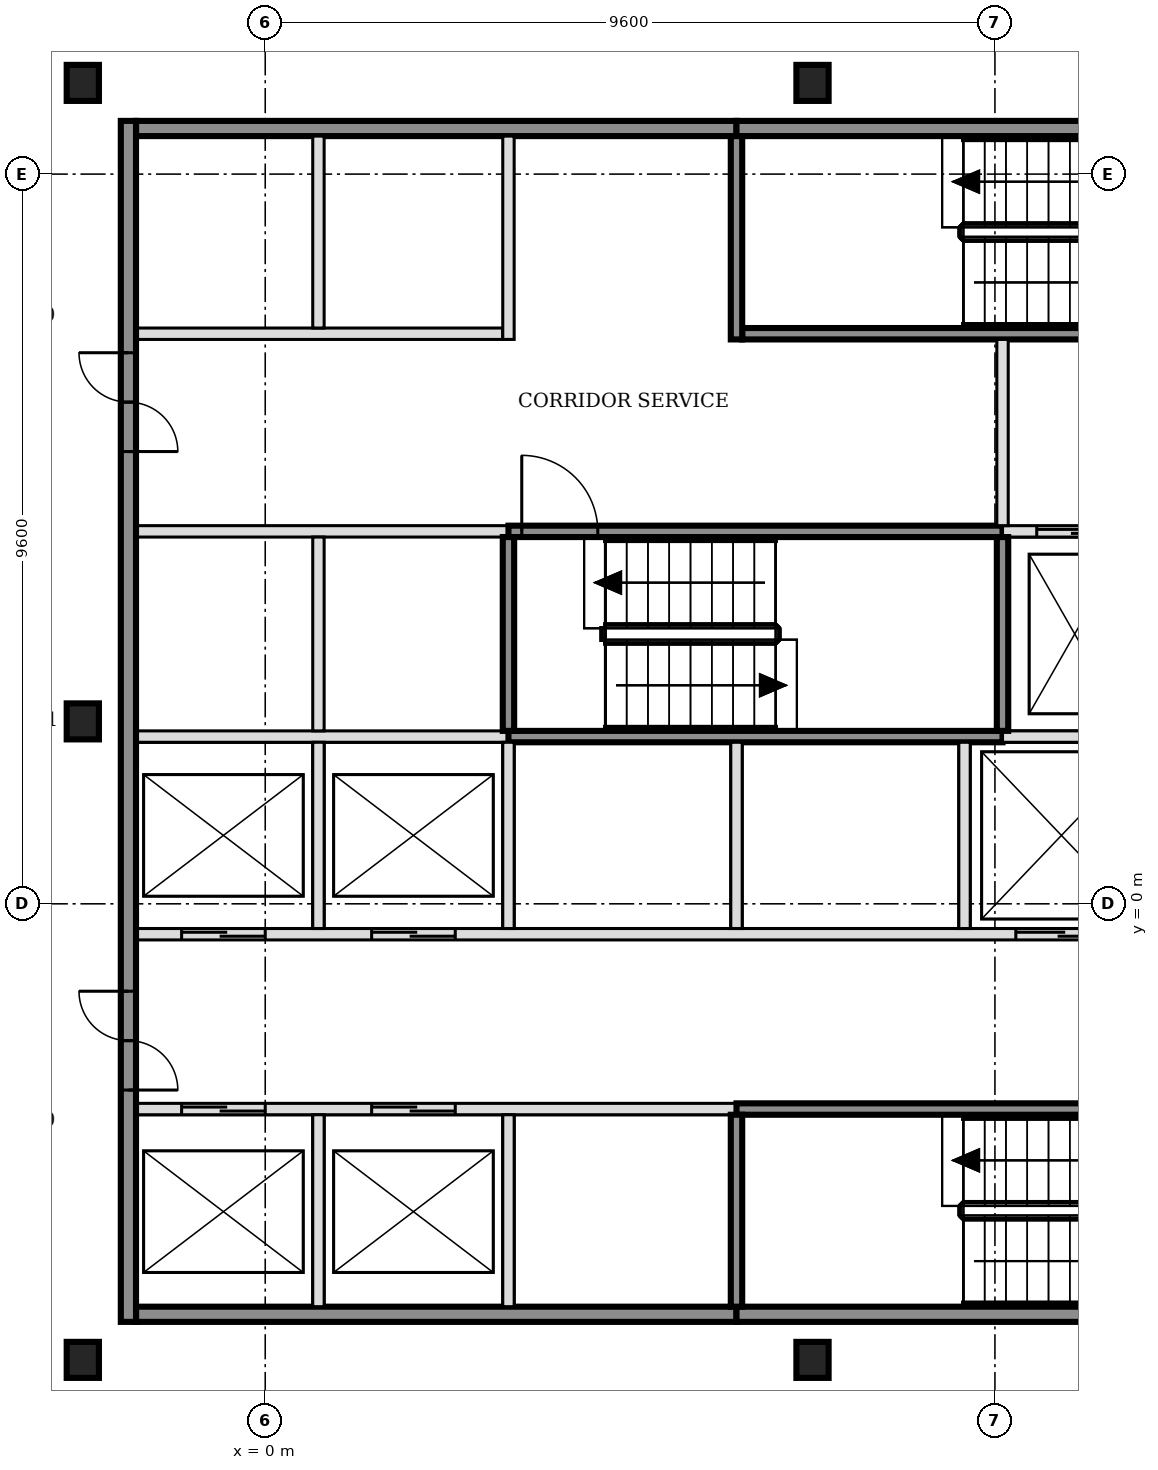
"""IFC4 building model, lengths in metres.
Left out: names, types, materials, properties, quantities, classifications, styles, units other than length and angle.
Written with IfcOpenShell. Run it as: python <this file> out.ifc"""

import sys

from ifc_helpers import new_model, si_unit, direction, frame, frame_2d, origin, origin_2d, place, context, subcontext, project, spatial, rectangle, i_section, extrude, element, fill, save


model = new_model("IFC4")
c1 = context("Model", 3, precision=1e-05, world=origin(), true_north=direction((0.0, 1.0)))
c2 = subcontext(c1, "Body", "Model", "MODEL_VIEW")
j1 = project(units=[si_unit("LENGTHUNIT", "METRE"), si_unit("PLANEANGLEUNIT", "RADIAN")], contexts=[c1])
p1 = place(None, origin())
s1 = spatial("IfcSite", under=j1, at=p1, CompositionType="ELEMENT")
p2 = place(p1, origin())
s2 = spatial("IfcBuilding", under=s1, at=p2, CompositionType="ELEMENT")
p3 = place(p2, frame((0.0, 0.0, 119.4)))
s3 = spatial("IfcBuildingStorey", under=s2, at=p3, CompositionType="ELEMENT", Elevation=119.4)
for number, where, z_axis, x_axis in (
    (1, (-2.4, -6.0, -0.25), (0.0, 0.0, 1.0), (1.0, 0.0, 0.0)),
    (2, (7.2, -6.0, -0.25), (0.0, 0.0, 1.0), (1.0, 0.0, 0.0)),
    (3, (-2.4, 2.4, -0.25), (0.0, 0.0, 1.0), (1.0, 0.0, 0.0)),
    (4, (-2.4, 10.8, -0.25), (0.0, 0.0, 1.0), (1.0, 0.0, 0.0)),
    (5, (7.2, 10.8, -0.25), (0.0, 0.0, 1.0), (1.0, 0.0, 0.0)),
):
    element("IfcColumn", number, at=place(p3, frame(where, z_axis=z_axis, x_axis=x_axis)), inside=s3, PredefinedType="COLUMN", context=c2, shape_type="SweptSolid", body=[
        extrude(i_section(OverallWidth=0.424, OverallDepth=0.474, WebThickness=0.048, FlangeThickness=0.077, FilletRadius=0.015, at=origin_2d()), origin(), (0.0, 0.0, 1.0), 6.1),
    ])
p4 = place(p3, frame((-1.7, -5.4, 0.0), z_axis=(0.0, 0.0, 1.0), x_axis=(1.0, 0.0, 0.0)))
e6 = element("IfcWall", 6, at=p4, inside=s3, PredefinedType="SOLIDWALL", context=c2, shape_type="SweptSolid", body=[
    extrude(rectangle(XDim=7.9, YDim=0.2, at=frame_2d((3.95, 0.0))), origin(), (0.0, 0.0, 1.0), 5.85),
])
p5 = place(p3, frame((6.2, -5.4, 0.0), z_axis=(0.0, 0.0, 1.0), x_axis=(1.0, 0.0, 0.0)))
e7 = element("IfcWall", 7, at=p5, inside=s3, PredefinedType="SOLIDWALL", context=c2, shape_type="SweptSolid", body=[
    extrude(rectangle(XDim=6.5, YDim=0.2, at=frame_2d((3.25, 0.0))), origin(), (0.0, 0.0, 1.0), 5.85),
])
p6 = place(p3, frame((-1.7, -2.7, 0.0), z_axis=(0.0, 0.0, 1.0), x_axis=(1.0, 0.0, 0.0)))
e8 = element("IfcWall", 8, at=p6, inside=s3, PredefinedType="SOLIDWALL", context=c2, shape_type="SweptSolid", body=[
    extrude(rectangle(XDim=7.9, YDim=0.15, at=frame_2d((3.95, 0.0))), origin(), (0.0, 0.0, 1.0), 5.85),
])
p7 = place(p6, frame((0.6, 0.0, 0.0)))
e9 = element("IfcOpeningElement", 9, at=p7, cuts=e8, PredefinedType="OPENING", context=c2, shape_type="SweptSolid", body=[
    extrude(rectangle(XDim=1.1, YDim=2.1, at=frame_2d((0.55, 1.05))), frame((0.0, 0.085, 0.0), z_axis=(0.0, -1.0, 0.0), x_axis=(1.0, 0.0, 0.0)), (0.0, 0.0, 1.0), 0.17),
])
p8 = place(p6, frame((3.1, 0.0, 0.0)))
e10 = element("IfcOpeningElement", 10, at=p8, cuts=e8, PredefinedType="OPENING", context=c2, shape_type="SweptSolid", body=[
    extrude(rectangle(XDim=1.1, YDim=2.1, at=frame_2d((0.55, 1.05))), frame((0.0, 0.085, 0.0), z_axis=(0.0, -1.0, 0.0), x_axis=(1.0, 0.0, 0.0)), (0.0, 0.0, 1.0), 0.17),
])
p9 = place(p3, frame((6.2, -2.7, 0.0), z_axis=(0.0, 0.0, 1.0), x_axis=(1.0, 0.0, 0.0)))
e11 = element("IfcWall", 11, at=p9, inside=s3, PredefinedType="SOLIDWALL", context=c2, shape_type="SweptSolid", body=[
    extrude(rectangle(XDim=6.425, YDim=0.15, at=frame_2d((3.212, 0.0))), origin(), (0.0, 0.0, 1.0), 5.85),
])
p10 = place(p9, frame((5.3, 0.0, 0.0)))
e12 = element("IfcOpeningElement", 12, at=p10, cuts=e11, PredefinedType="OPENING", context=c2, shape_type="SweptSolid", body=[
    extrude(rectangle(XDim=1.0, YDim=2.1, at=frame_2d((0.5, 1.05))), frame((0.0, 0.085, 0.0), z_axis=(0.0, -1.0, 0.0), x_axis=(1.0, 0.0, 0.0)), (0.0, 0.0, 1.0), 0.17),
])
p11 = place(p3, frame((-1.7, -0.4, 0.0), z_axis=(0.0, 0.0, 1.0), x_axis=(1.0, 0.0, 0.0)))
e13 = element("IfcWall", 13, at=p11, inside=s3, PredefinedType="SOLIDWALL", context=c2, shape_type="SweptSolid", body=[
    extrude(rectangle(XDim=15.925, YDim=0.15, at=frame_2d((7.962, 0.0))), origin(), (0.0, 0.0, 1.0), 5.85),
])
p12 = place(p11, frame((0.6, 0.0, 0.0)))
e14 = element("IfcOpeningElement", 14, at=p12, cuts=e13, PredefinedType="OPENING", context=c2, shape_type="SweptSolid", body=[
    extrude(rectangle(XDim=1.1, YDim=2.1, at=frame_2d((0.55, 1.05))), frame((0.0, 0.085, 0.0), z_axis=(0.0, -1.0, 0.0), x_axis=(1.0, 0.0, 0.0)), (0.0, 0.0, 1.0), 0.17),
])
p13 = place(p11, frame((3.1, 0.0, 0.0)))
e15 = element("IfcOpeningElement", 15, at=p13, cuts=e13, PredefinedType="OPENING", context=c2, shape_type="SweptSolid", body=[
    extrude(rectangle(XDim=1.1, YDim=2.1, at=frame_2d((0.55, 1.05))), frame((0.0, 0.085, 0.0), z_axis=(0.0, -1.0, 0.0), x_axis=(1.0, 0.0, 0.0)), (0.0, 0.0, 1.0), 0.17),
])
p14 = place(p11, frame((11.575, 0.0, 0.0)))
e16 = element("IfcOpeningElement", 16, at=p14, cuts=e13, PredefinedType="OPENING", context=c2, shape_type="SweptSolid", body=[
    extrude(rectangle(XDim=1.2, YDim=2.1, at=frame_2d((0.6, 1.05))), frame((0.0, 0.085, 0.0), z_axis=(0.0, -1.0, 0.0), x_axis=(1.0, 0.0, 0.0)), (0.0, 0.0, 1.0), 0.17),
])
p15 = place(p11, frame((14.125, 0.0, 0.0)))
e17 = element("IfcOpeningElement", 17, at=p15, cuts=e13, PredefinedType="OPENING", context=c2, shape_type="SweptSolid", body=[
    extrude(rectangle(XDim=1.2, YDim=2.1, at=frame_2d((0.6, 1.05))), frame((0.0, 0.085, 0.0), z_axis=(0.0, -1.0, 0.0), x_axis=(1.0, 0.0, 0.0)), (0.0, 0.0, 1.0), 0.17),
])
p16 = place(p3, frame((-1.7, 2.2, 0.0), z_axis=(0.0, 0.0, 1.0), x_axis=(1.0, 0.0, 0.0)))
e18 = element("IfcWall", 18, at=p16, inside=s3, PredefinedType="SOLIDWALL", context=c2, shape_type="SweptSolid", body=[
    extrude(rectangle(XDim=4.9, YDim=0.15, at=frame_2d((2.45, 0.0))), origin(), (0.0, 0.0, 1.0), 5.85),
])
p17 = place(p3, frame((3.2, 2.2, 0.0), z_axis=(0.0, 0.0, 1.0), x_axis=(1.0, 0.0, 0.0)))
e19 = element("IfcWall", 19, at=p17, inside=s3, PredefinedType="SOLIDWALL", context=c2, shape_type="SweptSolid", body=[
    extrude(rectangle(XDim=6.5, YDim=0.15, at=frame_2d((3.25, 0.0))), origin(), (0.0, 0.0, 1.0), 5.85),
])
p18 = place(p3, frame((9.7, 2.2, 0.0), z_axis=(0.0, 0.0, 1.0), x_axis=(1.0, 0.0, 0.0)))
e20 = element("IfcWall", 20, at=p18, inside=s3, PredefinedType="SOLIDWALL", context=c2, shape_type="SweptSolid", body=[
    extrude(rectangle(XDim=4.525, YDim=0.15, at=frame_2d((2.263, 0.0))), origin(), (0.0, 0.0, 1.0), 5.85),
])
p19 = place(p3, frame((-1.7, 4.9, 0.0), z_axis=(0.0, 0.0, 1.0), x_axis=(1.0, 0.0, 0.0)))
e21 = element("IfcWall", 21, at=p19, inside=s3, PredefinedType="SOLIDWALL", context=c2, shape_type="SweptSolid", body=[
    extrude(rectangle(XDim=4.9, YDim=0.15, at=frame_2d((2.45, 0.0))), origin(), (0.0, 0.0, 1.0), 5.85),
])
p20 = place(p3, frame((3.2, 4.9, 0.0), z_axis=(0.0, 0.0, 1.0), x_axis=(1.0, 0.0, 0.0)))
e22 = element("IfcWall", 22, at=p20, inside=s3, PredefinedType="SOLIDWALL", context=c2, shape_type="SweptSolid", body=[
    extrude(rectangle(XDim=6.5, YDim=0.15, at=frame_2d((3.25, 0.0))), origin(), (0.0, 0.0, 1.0), 5.85),
])
p21 = place(p20, frame((0.175, 0.0, 0.0)))
e23 = element("IfcOpeningElement", 23, at=p21, cuts=e22, PredefinedType="OPENING", context=c2, shape_type="SweptSolid", body=[
    extrude(rectangle(XDim=1.0, YDim=2.1, at=frame_2d((0.5, 1.05))), frame((0.0, 0.085, 0.0), z_axis=(0.0, -1.0, 0.0), x_axis=(1.0, 0.0, 0.0)), (0.0, 0.0, 1.0), 0.17),
])
p22 = place(p3, frame((9.7, 4.9, 0.0), z_axis=(0.0, 0.0, 1.0), x_axis=(1.0, 0.0, 0.0)))
e24 = element("IfcWall", 24, at=p22, inside=s3, PredefinedType="SOLIDWALL", context=c2, shape_type="SweptSolid", body=[
    extrude(rectangle(XDim=6.4, YDim=0.15, at=frame_2d((3.2, 0.0))), origin(), (0.0, 0.0, 1.0), 5.85),
])
p23 = place(p22, frame((0.45, 0.0, 0.0)))
e25 = element("IfcOpeningElement", 25, at=p23, cuts=e24, PredefinedType="OPENING", context=c2, shape_type="SweptSolid", body=[
    extrude(rectangle(XDim=1.0, YDim=2.1, at=frame_2d((0.5, 1.05))), frame((0.0, 0.085, 0.0), z_axis=(0.0, -1.0, 0.0), x_axis=(1.0, 0.0, 0.0)), (0.0, 0.0, 1.0), 0.17),
])
p24 = place(p22, frame((2.35, 0.0, 0.0)))
e26 = element("IfcOpeningElement", 26, at=p24, cuts=e24, PredefinedType="OPENING", context=c2, shape_type="SweptSolid", body=[
    extrude(rectangle(XDim=1.0, YDim=2.1, at=frame_2d((0.5, 1.05))), frame((0.0, 0.085, 0.0), z_axis=(0.0, -1.0, 0.0), x_axis=(1.0, 0.0, 0.0)), (0.0, 0.0, 1.0), 0.17),
])
p25 = place(p22, frame((4.7, 0.0, 0.0)))
e27 = element("IfcOpeningElement", 27, at=p25, cuts=e24, PredefinedType="OPENING", context=c2, shape_type="SweptSolid", body=[
    extrude(rectangle(XDim=0.9, YDim=2.1, at=frame_2d((0.45, 1.05))), frame((0.0, 0.085, 0.0), z_axis=(0.0, -1.0, 0.0), x_axis=(1.0, 0.0, 0.0)), (0.0, 0.0, 1.0), 0.17),
])
p26 = place(p3, frame((-1.7, 7.5, 0.0), z_axis=(0.0, 0.0, 1.0), x_axis=(1.0, 0.0, 0.0)))
e28 = element("IfcWall", 28, at=p26, inside=s3, PredefinedType="SOLIDWALL", context=c2, shape_type="SweptSolid", body=[
    extrude(rectangle(XDim=4.825, YDim=0.15, at=frame_2d((2.413, 0.0))), origin(), (0.0, 0.0, 1.0), 5.85),
])
p27 = place(p3, frame((6.275, 7.5, 0.0), z_axis=(0.0, 0.0, 1.0), x_axis=(1.0, 0.0, 0.0)))
e29 = element("IfcWall", 29, at=p27, inside=s3, PredefinedType="SOLIDWALL", context=c2, shape_type="SweptSolid", body=[
    extrude(rectangle(XDim=6.425, YDim=0.15, at=frame_2d((3.212, 0.0))), origin(), (0.0, 0.0, 1.0), 5.85),
])
p28 = place(p27, frame((5.225, 0.0, 0.0)))
e30 = element("IfcOpeningElement", 30, at=p28, cuts=e29, PredefinedType="OPENING", context=c2, shape_type="SweptSolid", body=[
    extrude(rectangle(XDim=1.0, YDim=2.1, at=frame_2d((0.5, 1.05))), frame((0.0, 0.085, 0.0), z_axis=(0.0, -1.0, 0.0), x_axis=(1.0, 0.0, 0.0)), (0.0, 0.0, 1.0), 0.17),
])
p29 = place(p3, frame((-1.7, 10.2, 0.0), z_axis=(0.0, 0.0, 1.0), x_axis=(1.0, 0.0, 0.0)))
e31 = element("IfcWall", 31, at=p29, inside=s3, PredefinedType="SOLIDWALL", context=c2, shape_type="SweptSolid", body=[
    extrude(rectangle(XDim=7.9, YDim=0.2, at=frame_2d((3.95, 0.0))), origin(), (0.0, 0.0, 1.0), 5.85),
])
p30 = place(p3, frame((6.2, 10.2, 0.0), z_axis=(0.0, 0.0, 1.0), x_axis=(1.0, 0.0, 0.0)))
e32 = element("IfcWall", 32, at=p30, inside=s3, PredefinedType="SOLIDWALL", context=c2, shape_type="SweptSolid", body=[
    extrude(rectangle(XDim=6.5, YDim=0.2, at=frame_2d((3.25, 0.0))), origin(), (0.0, 0.0, 1.0), 5.85),
])
p31 = place(p3, frame((-1.8, -5.5, 0.0), z_axis=(0.0, 0.0, 1.0), x_axis=(0.0, 1.0, 0.0)))
e33 = element("IfcWall", 33, at=p31, inside=s3, PredefinedType="SOLIDWALL", context=c2, shape_type="SweptSolid", body=[
    extrude(rectangle(XDim=15.8, YDim=0.2, at=frame_2d((7.9, 0.0))), origin(), (0.0, 0.0, 1.0), 5.85),
])
p32 = place(p31, frame((3.05, 0.0, 0.0)))
e34 = element("IfcOpeningElement", 34, at=p32, cuts=e33, PredefinedType="OPENING", context=c2, shape_type="SweptSolid", body=[
    extrude(rectangle(XDim=1.3, YDim=2.1, at=frame_2d((0.65, 1.05))), frame((0.0, 0.11, 0.0), z_axis=(0.0, -1.0, 0.0), x_axis=(1.0, 0.0, 0.0)), (0.0, 0.0, 1.0), 0.22),
])
p33 = place(p31, frame((11.45, 0.0, 0.0)))
e35 = element("IfcOpeningElement", 35, at=p33, cuts=e33, PredefinedType="OPENING", context=c2, shape_type="SweptSolid", body=[
    extrude(rectangle(XDim=1.3, YDim=2.1, at=frame_2d((0.65, 1.05))), frame((0.0, 0.11, 0.0), z_axis=(0.0, -1.0, 0.0), x_axis=(1.0, 0.0, 0.0)), (0.0, 0.0, 1.0), 0.22),
])
p34 = place(p3, frame((0.7, -5.3, 0.0), z_axis=(0.0, 0.0, 1.0), x_axis=(0.0, 1.0, 0.0)))
e36 = element("IfcWall", 36, at=p34, inside=s3, PredefinedType="SOLIDWALL", context=c2, shape_type="SweptSolid", body=[
    extrude(rectangle(XDim=2.525, YDim=0.15, at=frame_2d((1.263, 0.0))), origin(), (0.0, 0.0, 1.0), 5.85),
])
p35 = place(p3, frame((0.7, -0.325, 0.0), z_axis=(0.0, 0.0, 1.0), x_axis=(0.0, 1.0, 0.0)))
e37 = element("IfcWall", 37, at=p35, inside=s3, PredefinedType="SOLIDWALL", context=c2, shape_type="SweptSolid", body=[
    extrude(rectangle(XDim=2.45, YDim=0.15, at=frame_2d((1.225, 0.0))), origin(), (0.0, 0.0, 1.0), 5.85),
])
p36 = place(p3, frame((0.7, 2.275, 0.0), z_axis=(0.0, 0.0, 1.0), x_axis=(0.0, 1.0, 0.0)))
e38 = element("IfcWall", 38, at=p36, inside=s3, PredefinedType="SOLIDWALL", context=c2, shape_type="SweptSolid", body=[
    extrude(rectangle(XDim=2.55, YDim=0.15, at=frame_2d((1.275, 0.0))), origin(), (0.0, 0.0, 1.0), 5.85),
])
for number, where, z_axis, x_axis in (
    (39, (0.7, 7.575, 0.0), (0.0, 0.0, 1.0), (0.0, 1.0, 0.0)),
    (40, (3.2, -5.3, 0.0), (0.0, 0.0, 1.0), (0.0, 1.0, 0.0)),
):
    element("IfcWall", number, at=place(p3, frame(where, z_axis=z_axis, x_axis=x_axis)), inside=s3, PredefinedType="SOLIDWALL", context=c2, shape_type="SweptSolid", body=[
        extrude(rectangle(XDim=2.525, YDim=0.15, at=frame_2d((1.263, 0.0))), origin(), (0.0, 0.0, 1.0), 5.85),
    ])
p37 = place(p3, frame((3.2, -0.325, 0.0), z_axis=(0.0, 0.0, 1.0), x_axis=(0.0, 1.0, 0.0)))
e41 = element("IfcWall", 41, at=p37, inside=s3, PredefinedType="SOLIDWALL", context=c2, shape_type="SweptSolid", body=[
    extrude(rectangle(XDim=2.45, YDim=0.15, at=frame_2d((1.225, 0.0))), origin(), (0.0, 0.0, 1.0), 5.85),
])
p38 = place(p3, frame((3.2, 2.275, 0.0), z_axis=(0.0, 0.0, 1.0), x_axis=(0.0, 1.0, 0.0)))
e42 = element("IfcWall", 42, at=p38, inside=s3, PredefinedType="SOLIDWALL", context=c2, shape_type="SweptSolid", body=[
    extrude(rectangle(XDim=2.55, YDim=0.15, at=frame_2d((1.275, 0.0))), origin(), (0.0, 0.0, 1.0), 5.85),
])
p39 = place(p3, frame((3.2, 7.425, 0.0), z_axis=(0.0, 0.0, 1.0), x_axis=(0.0, 1.0, 0.0)))
e43 = element("IfcWall", 43, at=p39, inside=s3, PredefinedType="SOLIDWALL", context=c2, shape_type="SweptSolid", body=[
    extrude(rectangle(XDim=2.675, YDim=0.15, at=frame_2d((1.337, 0.0))), origin(), (0.0, 0.0, 1.0), 5.85),
])
p40 = place(p3, frame((6.2, -5.3, 0.0), z_axis=(0.0, 0.0, 1.0), x_axis=(0.0, 1.0, 0.0)))
e44 = element("IfcWall", 44, at=p40, inside=s3, PredefinedType="SOLIDWALL", context=c2, shape_type="SweptSolid", body=[
    extrude(rectangle(XDim=2.525, YDim=0.15, at=frame_2d((1.263, 0.0))), origin(), (0.0, 0.0, 1.0), 5.85),
])
p41 = place(p3, frame((6.2, -0.325, 0.0), z_axis=(0.0, 0.0, 1.0), x_axis=(0.0, 1.0, 0.0)))
e45 = element("IfcWall", 45, at=p41, inside=s3, PredefinedType="SOLIDWALL", context=c2, shape_type="SweptSolid", body=[
    extrude(rectangle(XDim=2.45, YDim=0.15, at=frame_2d((1.225, 0.0))), origin(), (0.0, 0.0, 1.0), 5.85),
])
p42 = place(p3, frame((6.2, 7.425, 0.0), z_axis=(0.0, 0.0, 1.0), x_axis=(0.0, 1.0, 0.0)))
e46 = element("IfcWall", 46, at=p42, inside=s3, PredefinedType="SOLIDWALL", context=c2, shape_type="SweptSolid", body=[
    extrude(rectangle(XDim=2.675, YDim=0.15, at=frame_2d((1.337, 0.0))), origin(), (0.0, 0.0, 1.0), 5.85),
])
p43 = place(p3, frame((9.2, -0.325, 0.0), z_axis=(0.0, 0.0, 1.0), x_axis=(0.0, 1.0, 0.0)))
e47 = element("IfcWall", 47, at=p43, inside=s3, PredefinedType="SOLIDWALL", context=c2, shape_type="SweptSolid", body=[
    extrude(rectangle(XDim=2.45, YDim=0.15, at=frame_2d((1.225, 0.0))), origin(), (0.0, 0.0, 1.0), 5.85),
])
p44 = place(p3, frame((9.7, 2.275, 0.0), z_axis=(0.0, 0.0, 1.0), x_axis=(0.0, 1.0, 0.0)))
e48 = element("IfcWall", 48, at=p44, inside=s3, PredefinedType="SOLIDWALL", context=c2, shape_type="SweptSolid", body=[
    extrude(rectangle(XDim=2.55, YDim=0.15, at=frame_2d((1.275, 0.0))), origin(), (0.0, 0.0, 1.0), 5.85),
])
p45 = place(p3, frame((9.7, 4.975, 0.0), z_axis=(0.0, 0.0, 1.0), x_axis=(0.0, 1.0, 0.0)))
e49 = element("IfcWall", 49, at=p45, inside=s3, PredefinedType="SOLIDWALL", context=c2, shape_type="SweptSolid", body=[
    extrude(rectangle(XDim=2.45, YDim=0.15, at=frame_2d((1.225, 0.0))), origin(), (0.0, 0.0, 1.0), 5.85),
])
p46 = place(p7, origin())
e50 = element("IfcDoor", 50, at=p46, inside=s3, OperationType="DOUBLE_DOOR_SLIDING", PredefinedType="DOOR", context=c2, shape_type="SweptSolid", body=[
    extrude(rectangle(XDim=1.1, YDim=2.1, at=frame_2d((0.55, 1.05))), frame((0.0, 0.025, 0.0), z_axis=(0.0, -1.0, 0.0), x_axis=(1.0, 0.0, 0.0)), (0.0, 0.0, 1.0), 0.05),
])
fill(e9, e50)
p47 = place(p8, origin())
e51 = element("IfcDoor", 51, at=p47, inside=s3, OperationType="DOUBLE_DOOR_SLIDING", PredefinedType="DOOR", context=c2, shape_type="SweptSolid", body=[
    extrude(rectangle(XDim=1.1, YDim=2.1, at=frame_2d((0.55, 1.05))), frame((0.0, 0.025, 0.0), z_axis=(0.0, -1.0, 0.0), x_axis=(1.0, 0.0, 0.0)), (0.0, 0.0, 1.0), 0.05),
])
fill(e10, e51)
p48 = place(p12, origin())
e52 = element("IfcDoor", 52, at=p48, inside=s3, OperationType="DOUBLE_DOOR_SLIDING", PredefinedType="DOOR", context=c2, shape_type="SweptSolid", body=[
    extrude(rectangle(XDim=1.1, YDim=2.1, at=frame_2d((0.55, 1.05))), frame((0.0, 0.025, 0.0), z_axis=(0.0, -1.0, 0.0), x_axis=(1.0, 0.0, 0.0)), (0.0, 0.0, 1.0), 0.05),
])
fill(e14, e52)
p49 = place(p13, origin())
e53 = element("IfcDoor", 53, at=p49, inside=s3, OperationType="DOUBLE_DOOR_SLIDING", PredefinedType="DOOR", context=c2, shape_type="SweptSolid", body=[
    extrude(rectangle(XDim=1.1, YDim=2.1, at=frame_2d((0.55, 1.05))), frame((0.0, 0.025, 0.0), z_axis=(0.0, -1.0, 0.0), x_axis=(1.0, 0.0, 0.0)), (0.0, 0.0, 1.0), 0.05),
])
fill(e15, e53)
p50 = place(p14, origin())
e54 = element("IfcDoor", 54, at=p50, inside=s3, OperationType="DOUBLE_DOOR_SLIDING", PredefinedType="DOOR", context=c2, shape_type="SweptSolid", body=[
    extrude(rectangle(XDim=1.2, YDim=2.1, at=frame_2d((0.6, 1.05))), frame((0.0, 0.025, 0.0), z_axis=(0.0, -1.0, 0.0), x_axis=(1.0, 0.0, 0.0)), (0.0, 0.0, 1.0), 0.05),
])
fill(e16, e54)
p51 = place(p23, origin())
e55 = element("IfcDoor", 55, at=p51, inside=s3, OperationType="DOUBLE_DOOR_SLIDING", PredefinedType="DOOR", context=c2, shape_type="SweptSolid", body=[
    extrude(rectangle(XDim=1.0, YDim=2.1, at=frame_2d((0.5, 1.05))), frame((0.0, 0.025, 0.0), z_axis=(0.0, -1.0, 0.0), x_axis=(1.0, 0.0, 0.0)), (0.0, 0.0, 1.0), 0.05),
])
fill(e25, e55)
p52 = place(p21, origin())
e56 = element("IfcDoor", 56, at=p52, inside=s3, OperationType="SINGLE_SWING_LEFT", PredefinedType="DOOR", context=c2, shape_type="SweptSolid", body=[
    extrude(rectangle(XDim=1.0, YDim=2.1, at=frame_2d((0.5, 1.05))), frame((0.0, 0.025, 0.0), z_axis=(0.0, -1.0, 0.0), x_axis=(1.0, 0.0, 0.0)), (0.0, 0.0, 1.0), 0.05),
])
fill(e23, e56)
p53 = place(p32, origin())
e57 = element("IfcDoor", 57, at=p53, inside=s3, OperationType="DOUBLE_DOOR_SINGLE_SWING", PredefinedType="DOOR", context=c2, shape_type="SweptSolid", body=[
    extrude(rectangle(XDim=1.3, YDim=2.1, at=frame_2d((0.65, 1.05))), frame((0.0, 0.025, 0.0), z_axis=(0.0, -1.0, 0.0), x_axis=(1.0, 0.0, 0.0)), (0.0, 0.0, 1.0), 0.05),
])
fill(e34, e57)
p54 = place(p33, origin())
e58 = element("IfcDoor", 58, at=p54, inside=s3, OperationType="DOUBLE_DOOR_SINGLE_SWING", PredefinedType="DOOR", context=c2, shape_type="SweptSolid", body=[
    extrude(rectangle(XDim=1.3, YDim=2.1, at=frame_2d((0.65, 1.05))), frame((0.0, 0.025, 0.0), z_axis=(0.0, -1.0, 0.0), x_axis=(1.0, 0.0, 0.0)), (0.0, 0.0, 1.0), 0.05),
])
fill(e35, e58)
save(model, sys.argv[1])
